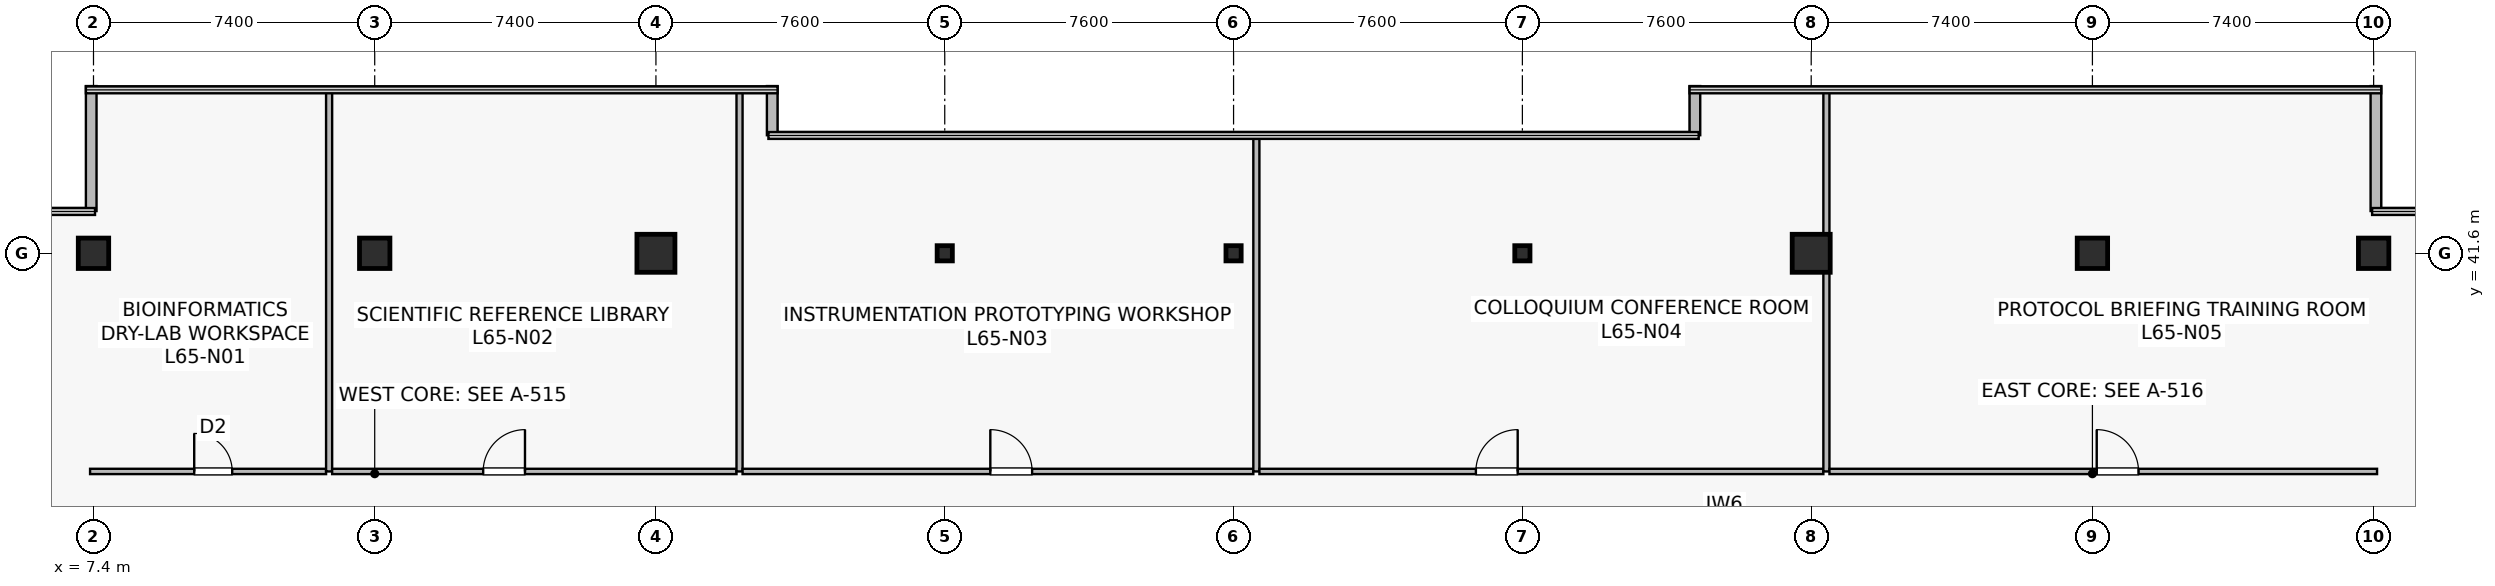
"""IFC4 building model, lengths in metres.
Left out: names, types, materials, properties, quantities, classifications, styles, units other than length and angle.
Written with IfcOpenShell. Run it as: python <this file> out.ifc"""

import sys

from ifc_helpers import new_model, si_unit, direction, frame, frame_2d, origin, origin_2d, place, context, subcontext, project, spatial, rectangle, hollow_rectangle, extrude, source, transform, mapped, element, fill, save


model = new_model("IFC4")
c1 = context("Model", 3, precision=1e-05, world=origin(), true_north=direction((0.0, 1.0)))
c2 = subcontext(c1, "Body", "Model", "MODEL_VIEW")
j1 = project(units=[si_unit("LENGTHUNIT", "METRE"), si_unit("PLANEANGLEUNIT", "RADIAN")], contexts=[c1])
p1 = place(None, origin())
s1 = spatial("IfcSite", under=j1, at=p1, CompositionType="ELEMENT")
p2 = place(p1, origin())
s2 = spatial("IfcBuilding", under=s1, at=p2, CompositionType="ELEMENT")
p3 = place(p2, frame((0.0, 0.0, 271.1)))
s3 = spatial("IfcBuildingStorey", under=s2, at=p3, CompositionType="ELEMENT", Elevation=271.1)
m1 = source(origin(), c2, "Body", "SweptSolid", [
    extrude(rectangle(XDim=0.8, YDim=0.8, at=origin_2d()), origin(), (0.0, 0.0, 1.0), 4.1),
])
p4 = place(p3, frame((14.8, 41.6, 0.0), z_axis=(0.0, 0.0, 1.0), x_axis=(1.0, 0.0, 0.0)))
e1 = element("IfcColumn", 1, at=p4, inside=s3, PredefinedType="COLUMN", context=c2, shape_type="MappedRepresentation", body=[
    mapped(m1, transform((0.0, 0.0, 0.0), scale=1.0)),
])
m2 = source(origin(), c2, "Body", "SweptSolid", [
    extrude(rectangle(XDim=1.0, YDim=1.0, at=origin_2d()), origin(), (0.0, 0.0, 1.0), 4.1),
])
for number, where, z_axis, x_axis in (
    (2, (22.2, 41.6, 0.0), (0.0, 0.0, 1.0), (1.0, 0.0, 0.0)),
    (3, (52.6, 41.6, 0.0), (0.0, 0.0, 1.0), (1.0, 0.0, 0.0)),
):
    element("IfcColumn", number, at=place(p3, frame(where, z_axis=z_axis, x_axis=x_axis)), inside=s3, PredefinedType="COLUMN", context=c2, shape_type="MappedRepresentation", body=[
        mapped(m2, transform((0.0, 0.0, 0.0), scale=1.0)),
    ])
for number, where, z_axis, x_axis in (
    (4, (60.0, 41.6, 0.0), (0.0, 0.0, 1.0), (1.0, 0.0, 0.0)),
    (5, (7.4, 41.6, 0.0), (0.0, 0.0, 1.0), (1.0, 0.0, 0.0)),
    (6, (67.4, 41.6, 0.0), (0.0, 0.0, 1.0), (1.0, 0.0, 0.0)),
):
    element("IfcColumn", number, at=place(p3, frame(where, z_axis=z_axis, x_axis=x_axis)), inside=s3, PredefinedType="COLUMN", context=c2, shape_type="MappedRepresentation", body=[
        mapped(m1, transform((0.0, 0.0, 0.0), scale=1.0)),
    ])
m3 = source(origin(), c2, "Body", "SweptSolid", [
    extrude(hollow_rectangle(XDim=0.4, YDim=0.4, WallThickness=0.019, at=origin_2d()), origin(), (0.0, 0.0, 1.0), 4.1),
])
for number, where, z_axis, x_axis in (
    (7, (29.8, 41.6, 0.0), (0.0, 0.0, 1.0), (1.0, 0.0, 0.0)),
    (8, (37.4, 41.6, 0.0), (0.0, 0.0, 1.0), (1.0, 0.0, 0.0)),
    (9, (45.0, 41.6, 0.0), (0.0, 0.0, 1.0), (1.0, 0.0, 0.0)),
):
    element("IfcColumn", number, at=place(p3, frame(where, z_axis=z_axis, x_axis=x_axis)), inside=s3, PredefinedType="COLUMN", context=c2, shape_type="MappedRepresentation", body=[
        mapped(m3, transform((0.0, 0.0, 0.0), scale=1.0)),
    ])
p5 = place(p3, frame((67.46, 42.712, 0.0), z_axis=(0.0, 0.0, 1.0), x_axis=(0.0, 1.0, 0.0)))
e10 = element("IfcWall", 10, at=p5, inside=s3, PredefinedType="STANDARD", context=c2, shape_type="SweptSolid", body=[
    extrude(rectangle(XDim=3.288, YDim=0.28, at=frame_2d((1.644, 0.0))), origin(), (0.0, 0.0, 1.0), 3.8),
])
for number, where, z_axis, x_axis in (
    (11, (49.54, 46.0, 0.0), (0.0, 0.0, 1.0), (0.0, -1.0, 0.0)),
    (12, (25.26, 44.707, 0.0), (0.0, 0.0, 1.0), (0.0, 1.0, 0.0)),
):
    element("IfcWall", number, at=place(p3, frame(where, z_axis=z_axis, x_axis=x_axis)), inside=s3, PredefinedType="STANDARD", context=c2, shape_type="SweptSolid", body=[
        extrude(rectangle(XDim=1.293, YDim=0.28, at=frame_2d((0.646, 0.0))), origin(), (0.0, 0.0, 1.0), 3.8),
    ])
p6 = place(p3, frame((7.34, 46.0, 0.0), z_axis=(0.0, 0.0, 1.0), x_axis=(0.0, -1.0, 0.0)))
e13 = element("IfcWall", 13, at=p6, inside=s3, PredefinedType="STANDARD", context=c2, shape_type="SweptSolid", body=[
    extrude(rectangle(XDim=3.288, YDim=0.28, at=frame_2d((1.644, 0.0))), origin(), (0.0, 0.0, 1.0), 3.8),
])
p7 = place(p3, frame((7.31, 35.86, 0.0), z_axis=(0.0, 0.0, 1.0), x_axis=(1.0, 0.0, 0.0)))
e14 = element("IfcWall", 14, at=p7, inside=s3, PredefinedType="PARTITIONING", context=c2, shape_type="SweptSolid", body=[
    extrude(rectangle(XDim=6.21, YDim=0.14, at=frame_2d((3.105, 0.0))), origin(), (0.0, 0.0, 1.0), 3.335),
])
p8 = place(p7, frame((2.74, 0.0, 0.0)))
e15 = element("IfcOpeningElement", 15, at=p8, cuts=e14, PredefinedType="OPENING", context=c2, shape_type="SweptSolid", body=[
    extrude(rectangle(XDim=1.0, YDim=2.15, at=frame_2d((0.5, 1.075))), frame((0.0, 0.08, 0.0), z_axis=(0.0, -1.0, 0.0), x_axis=(1.0, 0.0, 0.0)), (0.0, 0.0, 1.0), 0.16),
])
p9 = place(p3, frame((13.6, 35.86, 0.0), z_axis=(0.0, 0.0, 1.0), x_axis=(0.0, 1.0, 0.0)))
e16 = element("IfcWall", 16, at=p9, inside=s3, PredefinedType="PARTITIONING", context=c2, shape_type="SweptSolid", body=[
    extrude(rectangle(XDim=10.03, YDim=0.16, at=frame_2d((5.015, 0.0))), origin(), (0.0, 0.0, 1.0), 3.135),
])
p10 = place(p3, frame((13.68, 35.86, 0.0), z_axis=(0.0, 0.0, 1.0), x_axis=(1.0, 0.0, 0.0)))
e17 = element("IfcWall", 17, at=p10, inside=s3, PredefinedType="PARTITIONING", context=c2, shape_type="SweptSolid", body=[
    extrude(rectangle(XDim=10.64, YDim=0.14, at=frame_2d((5.32, 0.0))), origin(), (0.0, 0.0, 1.0), 3.197),
])
p11 = place(p10, frame((3.974, 0.0, 0.0)))
e18 = element("IfcOpeningElement", 18, at=p11, cuts=e17, PredefinedType="OPENING", context=c2, shape_type="SweptSolid", body=[
    extrude(rectangle(XDim=1.1, YDim=2.18, at=frame_2d((0.55, 1.09))), frame((0.0, 0.08, 0.0), z_axis=(0.0, -1.0, 0.0), x_axis=(1.0, 0.0, 0.0)), (0.0, 0.0, 1.0), 0.16),
])
p12 = place(p3, frame((24.4, 35.86, 0.0), z_axis=(0.0, 0.0, 1.0), x_axis=(0.0, 1.0, 0.0)))
e19 = element("IfcWall", 19, at=p12, inside=s3, PredefinedType="PARTITIONING", context=c2, shape_type="SweptSolid", body=[
    extrude(rectangle(XDim=10.03, YDim=0.16, at=frame_2d((5.015, 0.0))), origin(), (0.0, 0.0, 1.0), 3.135),
])
p13 = place(p3, frame((24.48, 35.86, 0.0), z_axis=(0.0, 0.0, 1.0), x_axis=(1.0, 0.0, 0.0)))
e20 = element("IfcWall", 20, at=p13, inside=s3, PredefinedType="PARTITIONING", context=c2, shape_type="SweptSolid", body=[
    extrude(rectangle(XDim=13.44, YDim=0.14, at=frame_2d((6.72, 0.0))), origin(), (0.0, 0.0, 1.0), 3.197),
])
p14 = place(p13, frame((6.519, 0.0, 0.0)))
e21 = element("IfcOpeningElement", 21, at=p14, cuts=e20, PredefinedType="OPENING", context=c2, shape_type="SweptSolid", body=[
    extrude(rectangle(XDim=1.1, YDim=2.18, at=frame_2d((0.55, 1.09))), frame((0.0, 0.08, 0.0), z_axis=(0.0, -1.0, 0.0), x_axis=(1.0, 0.0, 0.0)), (0.0, 0.0, 1.0), 0.16),
])
p15 = place(p3, frame((38.0, 35.86, 0.0), z_axis=(0.0, 0.0, 1.0), x_axis=(0.0, 1.0, 0.0)))
e22 = element("IfcWall", 22, at=p15, inside=s3, PredefinedType="PARTITIONING", context=c2, shape_type="SweptSolid", body=[
    extrude(rectangle(XDim=8.83, YDim=0.16, at=frame_2d((4.415, 0.0))), origin(), (0.0, 0.0, 1.0), 3.135),
])
p16 = place(p3, frame((38.08, 35.86, 0.0), z_axis=(0.0, 0.0, 1.0), x_axis=(1.0, 0.0, 0.0)))
e23 = element("IfcWall", 23, at=p16, inside=s3, PredefinedType="PARTITIONING", context=c2, shape_type="SweptSolid", body=[
    extrude(rectangle(XDim=14.84, YDim=0.14, at=frame_2d((7.42, 0.0))), origin(), (0.0, 0.0, 1.0), 3.197),
])
p17 = place(p16, frame((5.696, 0.0, 0.0)))
e24 = element("IfcOpeningElement", 24, at=p17, cuts=e23, PredefinedType="OPENING", context=c2, shape_type="SweptSolid", body=[
    extrude(rectangle(XDim=1.1, YDim=2.18, at=frame_2d((0.55, 1.09))), frame((0.0, 0.08, 0.0), z_axis=(0.0, -1.0, 0.0), x_axis=(1.0, 0.0, 0.0)), (0.0, 0.0, 1.0), 0.16),
])
p18 = place(p3, frame((53.0, 35.86, 0.0), z_axis=(0.0, 0.0, 1.0), x_axis=(0.0, 1.0, 0.0)))
e25 = element("IfcWall", 25, at=p18, inside=s3, PredefinedType="PARTITIONING", context=c2, shape_type="SweptSolid", body=[
    extrude(rectangle(XDim=10.03, YDim=0.16, at=frame_2d((5.015, 0.0))), origin(), (0.0, 0.0, 1.0), 3.135),
])
p19 = place(p3, frame((53.08, 35.86, 0.0), z_axis=(0.0, 0.0, 1.0), x_axis=(1.0, 0.0, 0.0)))
e26 = element("IfcWall", 26, at=p19, inside=s3, PredefinedType="PARTITIONING", context=c2, shape_type="SweptSolid", body=[
    extrude(rectangle(XDim=14.41, YDim=0.14, at=frame_2d((7.205, 0.0))), origin(), (0.0, 0.0, 1.0), 3.197),
])
p20 = place(p19, frame((7.033, 0.0, 0.0)))
e27 = element("IfcOpeningElement", 27, at=p20, cuts=e26, PredefinedType="OPENING", context=c2, shape_type="SweptSolid", body=[
    extrude(rectangle(XDim=1.1, YDim=2.18, at=frame_2d((0.55, 1.09))), frame((0.0, 0.08, 0.0), z_axis=(0.0, -1.0, 0.0), x_axis=(1.0, 0.0, 0.0)), (0.0, 0.0, 1.0), 0.16),
])
m4 = source(origin(), c2, "Body", "SweptSolid", [
    extrude(rectangle(XDim=1.0, YDim=2.15, at=frame_2d((0.5, 1.075))), frame((0.0, 0.025, 0.0), z_axis=(0.0, -1.0, 0.0), x_axis=(1.0, 0.0, 0.0)), (0.0, 0.0, 1.0), 0.05),
])
p21 = place(p8, origin())
e28 = element("IfcDoor", 28, at=p21, inside=s3, OperationType="SINGLE_SWING_LEFT", PredefinedType="DOOR", context=c2, shape_type="MappedRepresentation", body=[
    mapped(m4, transform((0.0, 0.0, 0.0), scale=1.0)),
])
fill(e15, e28)
m5 = source(origin(), c2, "Body", "SweptSolid", [
    extrude(rectangle(XDim=1.1, YDim=2.18, at=frame_2d((0.55, 1.09))), frame((0.0, 0.025, 0.0), z_axis=(0.0, -1.0, 0.0), x_axis=(1.0, 0.0, 0.0)), (0.0, 0.0, 1.0), 0.05),
])
p22 = place(p11, origin())
e29 = element("IfcDoor", 29, at=p22, inside=s3, OperationType="SINGLE_SWING_RIGHT", PredefinedType="DOOR", context=c2, shape_type="MappedRepresentation", body=[
    mapped(m5, transform((0.0, 0.0, 0.0), scale=1.0)),
])
fill(e18, e29)
p23 = place(p14, origin())
e30 = element("IfcDoor", 30, at=p23, inside=s3, OperationType="SINGLE_SWING_LEFT", PredefinedType="DOOR", context=c2, shape_type="MappedRepresentation", body=[
    mapped(m5, transform((0.0, 0.0, 0.0), scale=1.0)),
])
fill(e21, e30)
p24 = place(p17, origin())
e31 = element("IfcDoor", 31, at=p24, inside=s3, OperationType="SINGLE_SWING_RIGHT", PredefinedType="DOOR", context=c2, shape_type="MappedRepresentation", body=[
    mapped(m5, transform((0.0, 0.0, 0.0), scale=1.0)),
])
fill(e24, e31)
p25 = place(p20, origin())
e32 = element("IfcDoor", 32, at=p25, inside=s3, OperationType="SINGLE_SWING_LEFT", PredefinedType="DOOR", context=c2, shape_type="MappedRepresentation", body=[
    mapped(m5, transform((0.0, 0.0, 0.0), scale=1.0)),
])
fill(e27, e32)
save(model, sys.argv[1])
